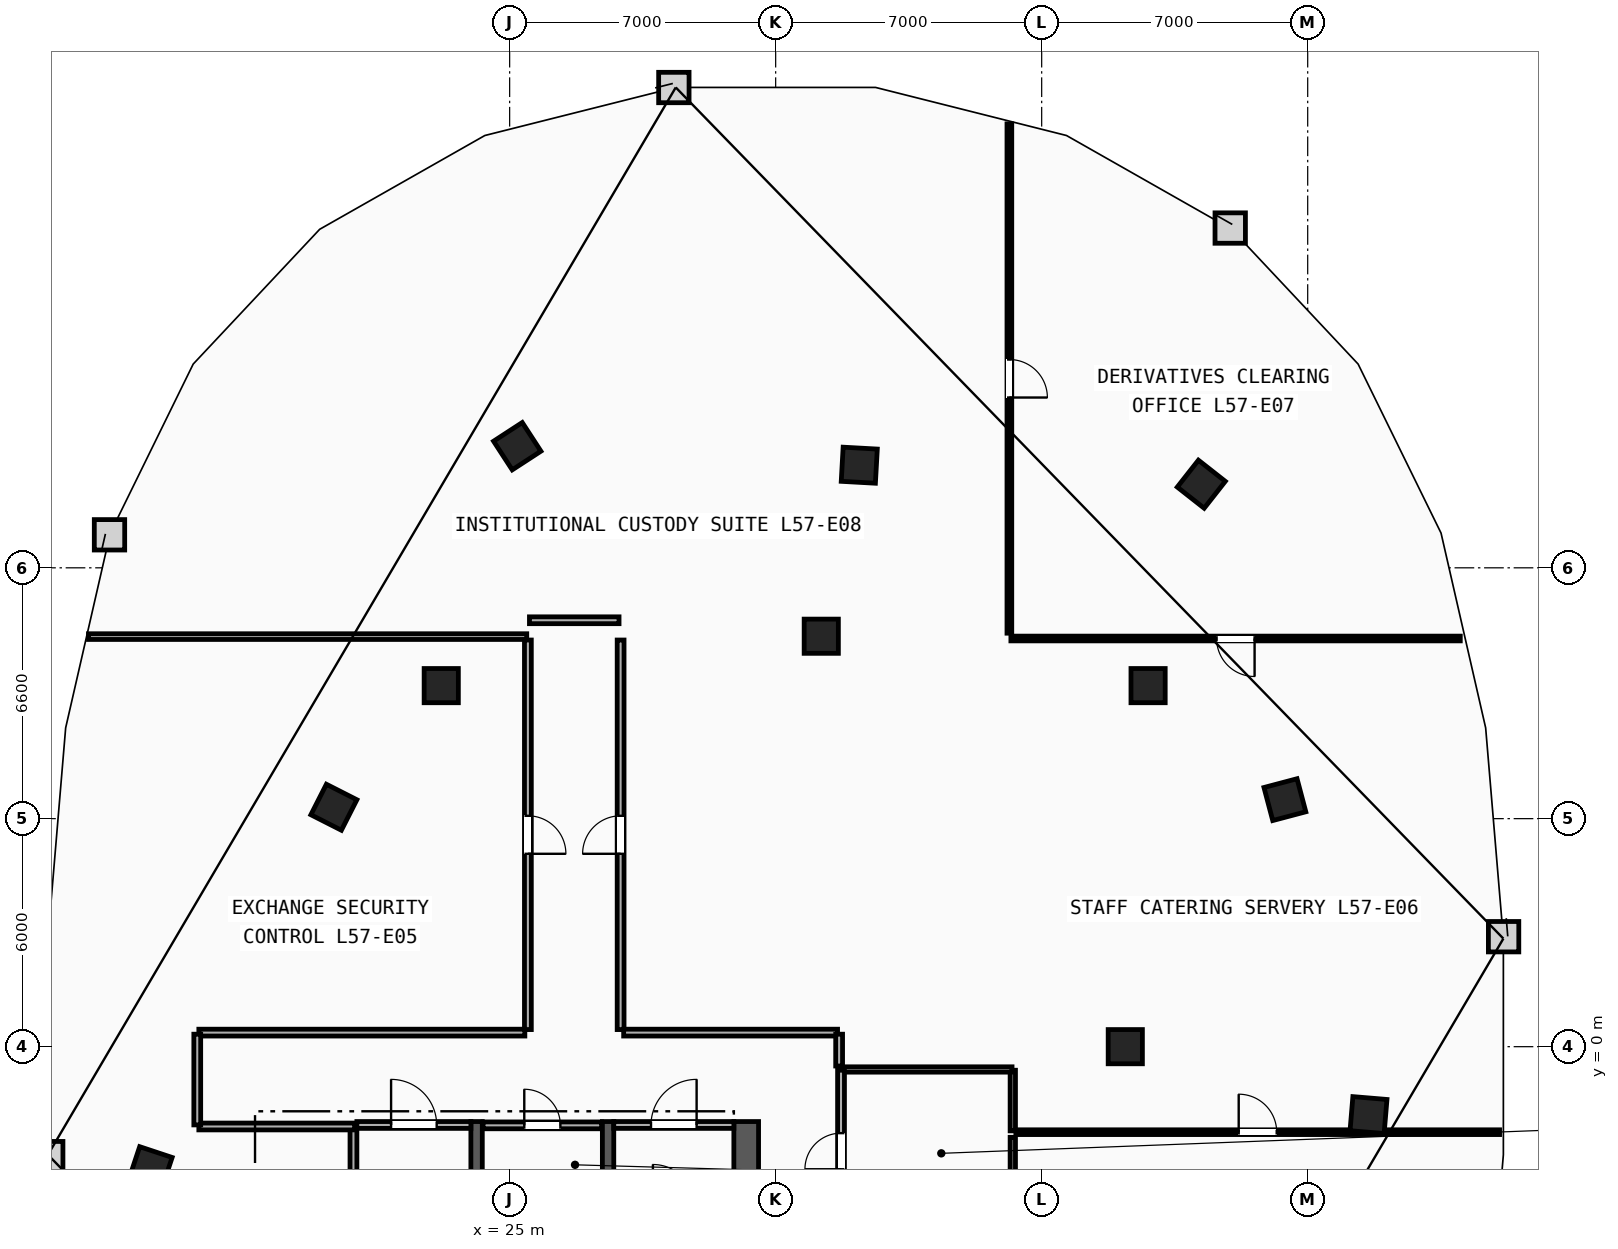
"""IFC4 building model, lengths in metres.
Left out: names, types, materials, properties, quantities, classifications, styles, units other than length and angle.
Written with IfcOpenShell. Run it as: python <this file> out.ifc"""

import sys

from ifc_helpers import new_model, si_unit, direction, frame, frame_2d, origin, origin_2d, place, context, subcontext, project, spatial, rectangle, extrude, element, fill, save


model = new_model("IFC4")
c1 = context("Model", 3, precision=1e-05, world=origin(), true_north=direction((0.0, 1.0)))
c2 = subcontext(c1, "Body", "Model", "MODEL_VIEW")
j1 = project(units=[si_unit("LENGTHUNIT", "METRE"), si_unit("PLANEANGLEUNIT", "RADIAN")], contexts=[c1])
p1 = place(None, origin())
s1 = spatial("IfcSite", under=j1, at=p1, CompositionType="ELEMENT")
p2 = place(p1, origin())
s2 = spatial("IfcBuilding", under=s1, at=p2, CompositionType="ELEMENT")
p3 = place(p2, frame((0.0, 0.0, 217.0)))
s3 = spatial("IfcBuildingStorey", under=s2, at=p3, CompositionType="ELEMENT", Elevation=217.0)
for number, where, z_axis, x_axis in (
    (1, (41.2, 0.0, 0.0), (0.0, 0.0, 1.0), (1.0, 0.0, 0.0)),
    (2, (41.8, 9.5, 0.0), (0.0, 0.0, 1.0), (1.0, 0.0, 0.0)),
    (3, (33.2, 10.8, 0.0), (0.0, 0.0, 1.0), (1.0, 0.0, 0.0)),
    (4, (23.2, 9.5, 0.0), (0.0, 0.0, 1.0), (1.0, 0.0, 0.0)),
    (5, (15.55, -3.2, 0.0), (0.0, 0.0, 1.0), (-0.315, -0.949, 0.0)),
    (6, (47.6, -1.8, 0.0), (0.0, 0.0, 1.0), (0.084, 0.997, 0.0)),
    (7, (45.4, 6.5, 0.0), (0.0, 0.0, 1.0), (-0.256, 0.967, 0.0)),
    (8, (43.2, 14.8, 0.0), (0.0, 0.0, 1.0), (-0.786, 0.618, 0.0)),
    (9, (34.2, 15.3, 0.0), (0.0, 0.0, 1.0), (-0.998, 0.055, 0.0)),
    (10, (25.2, 15.8, 0.0), (0.0, 0.0, 1.0), (-0.838, -0.546, 0.0)),
    (11, (20.375, 6.3, 0.0), (0.0, 0.0, 1.0), (-0.453, -0.892, 0.0)),
):
    element("IfcColumn", number, at=place(p3, frame(where, z_axis=z_axis, x_axis=x_axis)), inside=s3, PredefinedType="COLUMN", context=c2, shape_type="SweptSolid", body=[
        extrude(rectangle(XDim=0.9, YDim=0.9, at=origin_2d()), origin(), (0.0, 0.0, 1.0), 3.6),
    ])
p4 = place(p3, frame((31.225, -15.3, 0.0), z_axis=(0.0, 0.0, 1.0), x_axis=(0.0, 1.0, 0.0)))
e12 = element("IfcWall", 12, at=p4, inside=s3, PredefinedType="SHEAR", context=c2, shape_type="SweptSolid", body=[
    extrude(rectangle(XDim=13.33, YDim=0.65, at=frame_2d((6.665, 0.0))), origin(), (0.0, 0.0, 1.0), 3.34),
])
for number, where, z_axis, x_axis in (
    (13, (27.59, -12.65, 0.0), (0.0, 0.0, 1.0), (0.0, 1.0, 0.0)),
    (14, (24.13, -12.65, 0.0), (0.0, 0.0, 1.0), (0.0, 1.0, 0.0)),
):
    element("IfcWall", number, at=place(p3, frame(where, z_axis=z_axis, x_axis=x_axis)), inside=s3, PredefinedType="SHEAR", context=c2, shape_type="SweptSolid", body=[
        extrude(rectangle(XDim=10.68, YDim=0.3, at=frame_2d((5.34, 0.0))), origin(), (0.0, 0.0, 1.0), 3.34),
    ])
p5 = place(p3, frame((20.89, -7.45, 0.0), z_axis=(0.0, 0.0, 1.0), x_axis=(0.0, 1.0, 0.0)))
e15 = element("IfcWall", 15, at=p5, inside=s3, PredefinedType="PARTITIONING", context=c2, shape_type="SweptSolid", body=[
    extrude(rectangle(XDim=5.3, YDim=0.18, at=frame_2d((2.65, 0.0))), origin(), (0.0, 0.0, 1.0), 3.34),
])
p6 = place(p3, frame((20.98, -2.06, 0.0), z_axis=(0.0, 0.0, 1.0), x_axis=(1.0, 0.0, 0.0)))
e16 = element("IfcWall", 16, at=p6, inside=s3, PredefinedType="PARTITIONING", context=c2, shape_type="SweptSolid", body=[
    extrude(rectangle(XDim=3.0, YDim=0.18, at=frame_2d((1.5, 0.0))), origin(), (0.0, 0.0, 1.0), 3.34),
])
p7 = place(p6, frame((0.9, 0.0, 0.0)))
e17 = element("IfcOpeningElement", 17, at=p7, cuts=e16, PredefinedType="OPENING", context=c2, shape_type="SweptSolid", body=[
    extrude(rectangle(XDim=1.2, YDim=2.15, at=frame_2d((0.6, 1.075))), frame((0.0, 0.1, 0.0), z_axis=(0.0, -1.0, 0.0), x_axis=(1.0, 0.0, 0.0)), (0.0, 0.0, 1.0), 0.2),
])
p8 = place(p3, frame((27.74, -2.06, 0.0), z_axis=(0.0, 0.0, 1.0), x_axis=(1.0, 0.0, 0.0)))
e18 = element("IfcWall", 18, at=p8, inside=s3, PredefinedType="PARTITIONING", context=c2, shape_type="SweptSolid", body=[
    extrude(rectangle(XDim=3.16, YDim=0.18, at=frame_2d((1.58, 0.0))), origin(), (0.0, 0.0, 1.0), 3.34),
])
p9 = place(p8, frame((0.98, 0.0, 0.0)))
e19 = element("IfcOpeningElement", 19, at=p9, cuts=e18, PredefinedType="OPENING", context=c2, shape_type="SweptSolid", body=[
    extrude(rectangle(XDim=1.2, YDim=2.15, at=frame_2d((0.6, 1.075))), frame((0.0, 0.1, 0.0), z_axis=(0.0, -1.0, 0.0), x_axis=(1.0, 0.0, 0.0)), (0.0, 0.0, 1.0), 0.2),
])
p10 = place(p3, frame((24.3, -2.07, 0.0), z_axis=(0.0, 0.0, 1.0), x_axis=(1.0, 0.0, 0.0)))
e20 = element("IfcWall", 20, at=p10, inside=s3, PredefinedType="PARTITIONING", context=c2, shape_type="SweptSolid", body=[
    extrude(rectangle(XDim=3.12, YDim=0.18, at=frame_2d((1.56, 0.0))), origin(), (0.0, 0.0, 1.0), 3.34),
])
p11 = place(p10, frame((1.085, 0.0, 0.0)))
e21 = element("IfcOpeningElement", 21, at=p11, cuts=e20, PredefinedType="OPENING", context=c2, shape_type="SweptSolid", body=[
    extrude(rectangle(XDim=0.95, YDim=2.1, at=frame_2d((0.475, 1.05))), frame((0.0, 0.1, 0.0), z_axis=(0.0, -1.0, 0.0), x_axis=(1.0, 0.0, 0.0)), (0.0, 0.0, 1.0), 0.2),
])
p12 = place(p3, frame((38.24, -4.895, 0.0), z_axis=(0.0, 0.0, 1.0), x_axis=(0.0, 1.0, 0.0)))
e22 = element("IfcWall", 22, at=p12, inside=s3, PredefinedType="PARTITIONING", context=c2, shape_type="SweptSolid", body=[
    extrude(rectangle(XDim=2.51, YDim=0.14, at=frame_2d((1.255, 0.0))), origin(), (0.0, 0.0, 1.0), 3.34),
])
p13 = place(p3, frame((38.24, -2.215, 0.0), z_axis=(0.0, 0.0, 1.0), x_axis=(0.0, 1.0, 0.0)))
e23 = element("IfcWall", 23, at=p13, inside=s3, PredefinedType="PARTITIONING", context=c2, shape_type="SweptSolid", body=[
    extrude(rectangle(XDim=1.595, YDim=0.14, at=frame_2d((0.797, 0.0))), origin(), (0.0, 0.0, 1.0), 3.34),
])
p14 = place(p3, frame((33.74, -0.6, 0.0), z_axis=(0.0, 0.0, 1.0), x_axis=(1.0, 0.0, 0.0)))
e24 = element("IfcWall", 24, at=p14, inside=s3, PredefinedType="PARTITIONING", context=c2, shape_type="SweptSolid", body=[
    extrude(rectangle(XDim=4.48, YDim=0.14, at=frame_2d((2.24, 0.0))), origin(), (0.0, 0.0, 1.0), 3.34),
])
p15 = place(p3, frame((33.72, -4.88, 0.0), z_axis=(0.0, 0.0, 1.0), x_axis=(0.0, 1.0, 0.0)))
e25 = element("IfcWall", 25, at=p15, inside=s3, PredefinedType="PARTITIONING", context=c2, shape_type="SweptSolid", body=[
    extrude(rectangle(XDim=4.26, YDim=0.18, at=frame_2d((2.13, 0.0))), origin(), (0.0, 0.0, 1.0), 3.34),
])
p16 = place(p15, frame((1.655, 0.0, 0.0)))
e26 = element("IfcOpeningElement", 26, at=p16, cuts=e25, PredefinedType="OPENING", context=c2, shape_type="SweptSolid", body=[
    extrude(rectangle(XDim=0.95, YDim=2.1, at=frame_2d((0.475, 1.05))), frame((0.0, 0.1, 0.0), z_axis=(0.0, -1.0, 0.0), x_axis=(1.0, 0.0, 0.0)), (0.0, 0.0, 1.0), 0.2),
])
p17 = place(p3, frame((13.918, 10.79, 0.0), z_axis=(0.0, 0.0, 1.0), x_axis=(1.0, 0.0, 0.0)))
e27 = element("IfcWall", 27, at=p17, inside=s3, PredefinedType="PARTITIONING", context=c2, shape_type="SweptSolid", body=[
    extrude(rectangle(XDim=11.532, YDim=0.15, at=frame_2d((5.766, 0.0))), origin(), (0.0, 0.0, 1.0), 3.34),
])
p18 = place(p3, frame((25.48, 10.7, 0.0), z_axis=(0.0, 0.0, 1.0), x_axis=(0.0, -1.0, 0.0)))
e28 = element("IfcWall", 28, at=p18, inside=s3, PredefinedType="PARTITIONING", context=c2, shape_type="SweptSolid", body=[
    extrude(rectangle(XDim=10.25, YDim=0.18, at=frame_2d((5.125, 0.0))), origin(), (0.0, 0.0, 1.0), 3.34),
])
p19 = place(p18, frame((4.625, 0.0, 0.0)))
e29 = element("IfcOpeningElement", 29, at=p19, cuts=e28, PredefinedType="OPENING", context=c2, shape_type="SweptSolid", body=[
    extrude(rectangle(XDim=1.0, YDim=2.15, at=frame_2d((0.5, 1.075))), frame((0.0, 0.1, 0.0), z_axis=(0.0, -1.0, 0.0), x_axis=(1.0, 0.0, 0.0)), (0.0, 0.0, 1.0), 0.2),
])
p20 = place(p3, frame((25.4, 0.37, 0.0), z_axis=(0.0, 0.0, 1.0), x_axis=(-1.0, 0.0, 0.0)))
e30 = element("IfcWall", 30, at=p20, inside=s3, PredefinedType="PARTITIONING", context=c2, shape_type="SweptSolid", body=[
    extrude(rectangle(XDim=8.578, YDim=0.18, at=frame_2d((4.289, 0.0))), origin(), (0.0, 0.0, 1.0), 3.34),
])
p21 = place(p3, frame((16.822, -2.1, 0.0), z_axis=(0.0, 0.0, 1.0), x_axis=(1.0, 0.0, 0.0)))
e31 = element("IfcWall", 31, at=p21, inside=s3, PredefinedType="PARTITIONING", context=c2, shape_type="SweptSolid", body=[
    extrude(rectangle(XDim=4.098, YDim=0.18, at=frame_2d((2.049, 0.0))), origin(), (0.0, 0.0, 1.0), 3.34),
])
p22 = place(p3, frame((16.78, 0.329, 0.0), z_axis=(0.0, 0.0, 1.0), x_axis=(0.0, -1.0, 0.0)))
e32 = element("IfcWall", 32, at=p22, inside=s3, PredefinedType="PARTITIONING", context=c2, shape_type="SweptSolid", body=[
    extrude(rectangle(XDim=2.387, YDim=0.18, at=frame_2d((1.194, 0.0))), origin(), (0.0, 0.0, 1.0), 3.34),
])
p23 = place(p3, frame((27.92, 0.45, 0.0), z_axis=(0.0, 0.0, 1.0), x_axis=(0.0, 1.0, 0.0)))
e33 = element("IfcWall", 33, at=p23, inside=s3, PredefinedType="PARTITIONING", context=c2, shape_type="SweptSolid", body=[
    extrude(rectangle(XDim=10.25, YDim=0.18, at=frame_2d((5.125, 0.0))), origin(), (0.0, 0.0, 1.0), 3.34),
])
p24 = place(p23, frame((4.625, 0.0, 0.0)))
e34 = element("IfcOpeningElement", 34, at=p24, cuts=e33, PredefinedType="OPENING", context=c2, shape_type="SweptSolid", body=[
    extrude(rectangle(XDim=1.0, YDim=2.15, at=frame_2d((0.5, 1.075))), frame((0.0, 0.1, 0.0), z_axis=(0.0, -1.0, 0.0), x_axis=(1.0, 0.0, 0.0)), (0.0, 0.0, 1.0), 0.2),
])
p25 = place(p3, frame((33.628, 0.37, 0.0), z_axis=(0.0, 0.0, 1.0), x_axis=(-1.0, 0.0, 0.0)))
e35 = element("IfcWall", 35, at=p25, inside=s3, PredefinedType="PARTITIONING", context=c2, shape_type="SweptSolid", body=[
    extrude(rectangle(XDim=5.628, YDim=0.18, at=frame_2d((2.814, 0.0))), origin(), (0.0, 0.0, 1.0), 3.34),
])
p26 = place(p3, frame((33.67, -0.509, 0.0), z_axis=(0.0, 0.0, 1.0), x_axis=(0.0, 1.0, 0.0)))
e36 = element("IfcWall", 36, at=p26, inside=s3, PredefinedType="PARTITIONING", context=c2, shape_type="SweptSolid", body=[
    extrude(rectangle(XDim=0.837, YDim=0.18, at=frame_2d((0.418, 0.0))), origin(), (0.0, 0.0, 1.0), 3.34),
])
p27 = place(p3, frame((27.878, 11.22, 0.0), z_axis=(0.0, 0.0, 1.0), x_axis=(-1.0, 0.0, 0.0)))
e37 = element("IfcWall", 37, at=p27, inside=s3, PredefinedType="PARTITIONING", context=c2, shape_type="SweptSolid", body=[
    extrude(rectangle(XDim=2.357, YDim=0.18, at=frame_2d((1.178, 0.0))), origin(), (0.0, 0.0, 1.0), 3.34),
])
p28 = place(p3, frame((38.32, -2.25, 0.0), z_axis=(0.0, 0.0, 1.0), x_axis=(1.0, 0.0, 0.0)))
e38 = element("IfcWall", 38, at=p28, inside=s3, PredefinedType="PARTITIONING", context=c2, shape_type="SweptSolid", body=[
    extrude(rectangle(XDim=12.729, YDim=0.125, at=frame_2d((6.365, 0.0))), origin(), (0.0, 0.0, 1.0), 3.34),
])
p29 = place(p28, frame((5.865, 0.0, 0.0)))
e39 = element("IfcOpeningElement", 39, at=p29, cuts=e38, PredefinedType="OPENING", context=c2, shape_type="SweptSolid", body=[
    extrude(rectangle(XDim=1.0, YDim=2.15, at=frame_2d((0.5, 1.075))), frame((0.0, 0.073, 0.0), z_axis=(0.0, -1.0, 0.0), x_axis=(1.0, 0.0, 0.0)), (0.0, 0.0, 1.0), 0.145),
])
p30 = place(p3, frame((50.015, 10.74, 0.0), z_axis=(0.0, 0.0, 1.0), x_axis=(-1.0, 0.0, 0.0)))
e40 = element("IfcWall", 40, at=p30, inside=s3, PredefinedType="PARTITIONING", context=c2, shape_type="SweptSolid", body=[
    extrude(rectangle(XDim=11.825, YDim=0.125, at=frame_2d((5.913, 0.0))), origin(), (0.0, 0.0, 1.0), 3.34),
])
p31 = place(p30, frame((5.412, 0.0, 0.0)))
e41 = element("IfcOpeningElement", 41, at=p31, cuts=e40, PredefinedType="OPENING", context=c2, shape_type="SweptSolid", body=[
    extrude(rectangle(XDim=1.0, YDim=2.15, at=frame_2d((0.5, 1.075))), frame((0.0, 0.073, 0.0), z_axis=(0.0, -1.0, 0.0), x_axis=(1.0, 0.0, 0.0)), (0.0, 0.0, 1.0), 0.145),
])
p32 = place(p3, frame((38.15, 24.281, 0.0), z_axis=(0.0, 0.0, 1.0), x_axis=(0.0, -1.0, 0.0)))
e42 = element("IfcWall", 42, at=p32, inside=s3, PredefinedType="PARTITIONING", context=c2, shape_type="SweptSolid", body=[
    extrude(rectangle(XDim=13.401, YDim=0.125, at=frame_2d((6.701, 0.0))), origin(), (0.0, 0.0, 1.0), 3.34),
])
p33 = place(p32, frame((6.201, 0.0, 0.0)))
e43 = element("IfcOpeningElement", 43, at=p33, cuts=e42, PredefinedType="OPENING", context=c2, shape_type="SweptSolid", body=[
    extrude(rectangle(XDim=1.0, YDim=2.15, at=frame_2d((0.5, 1.075))), frame((0.0, 0.073, 0.0), z_axis=(0.0, -1.0, 0.0), x_axis=(1.0, 0.0, 0.0)), (0.0, 0.0, 1.0), 0.145),
])
p34 = place(p7, origin())
e44 = element("IfcDoor", 44, at=p34, inside=s3, OperationType="SINGLE_SWING_LEFT", PredefinedType="DOOR", context=c2, shape_type="SweptSolid", body=[
    extrude(rectangle(XDim=1.2, YDim=2.15, at=frame_2d((0.6, 1.075))), frame((0.0, 0.025, 0.0), z_axis=(0.0, -1.0, 0.0), x_axis=(1.0, 0.0, 0.0)), (0.0, 0.0, 1.0), 0.05),
])
fill(e17, e44)
p35 = place(p9, origin())
e45 = element("IfcDoor", 45, at=p35, inside=s3, OperationType="SINGLE_SWING_RIGHT", PredefinedType="DOOR", context=c2, shape_type="SweptSolid", body=[
    extrude(rectangle(XDim=1.2, YDim=2.15, at=frame_2d((0.6, 1.075))), frame((0.0, 0.025, 0.0), z_axis=(0.0, -1.0, 0.0), x_axis=(1.0, 0.0, 0.0)), (0.0, 0.0, 1.0), 0.05),
])
fill(e19, e45)
p36 = place(p33, origin())
e46 = element("IfcDoor", 46, at=p36, inside=s3, OperationType="SINGLE_SWING_RIGHT", PredefinedType="DOOR", context=c2, shape_type="SweptSolid", body=[
    extrude(rectangle(XDim=1.0, YDim=2.15, at=frame_2d((0.5, 1.075))), frame((0.0, 0.025, 0.0), z_axis=(0.0, -1.0, 0.0), x_axis=(1.0, 0.0, 0.0)), (0.0, 0.0, 1.0), 0.05),
])
fill(e43, e46)
p37 = place(p29, origin())
e47 = element("IfcDoor", 47, at=p37, inside=s3, OperationType="SINGLE_SWING_LEFT", PredefinedType="DOOR", context=c2, shape_type="SweptSolid", body=[
    extrude(rectangle(XDim=1.0, YDim=2.15, at=frame_2d((0.5, 1.075))), frame((0.0, 0.025, 0.0), z_axis=(0.0, -1.0, 0.0), x_axis=(1.0, 0.0, 0.0)), (0.0, 0.0, 1.0), 0.05),
])
fill(e39, e47)
p38 = place(p31, origin())
e48 = element("IfcDoor", 48, at=p38, inside=s3, OperationType="SINGLE_SWING_LEFT", PredefinedType="DOOR", context=c2, shape_type="SweptSolid", body=[
    extrude(rectangle(XDim=1.0, YDim=2.15, at=frame_2d((0.5, 1.075))), frame((0.0, 0.025, 0.0), z_axis=(0.0, -1.0, 0.0), x_axis=(1.0, 0.0, 0.0)), (0.0, 0.0, 1.0), 0.05),
])
fill(e41, e48)
p39 = place(p19, origin())
e49 = element("IfcDoor", 49, at=p39, inside=s3, OperationType="SINGLE_SWING_RIGHT", PredefinedType="DOOR", context=c2, shape_type="SweptSolid", body=[
    extrude(rectangle(XDim=1.0, YDim=2.15, at=frame_2d((0.5, 1.075))), frame((0.0, 0.025, 0.0), z_axis=(0.0, -1.0, 0.0), x_axis=(1.0, 0.0, 0.0)), (0.0, 0.0, 1.0), 0.05),
])
fill(e29, e49)
p40 = place(p24, origin())
e50 = element("IfcDoor", 50, at=p40, inside=s3, OperationType="SINGLE_SWING_LEFT", PredefinedType="DOOR", context=c2, shape_type="SweptSolid", body=[
    extrude(rectangle(XDim=1.0, YDim=2.15, at=frame_2d((0.5, 1.075))), frame((0.0, 0.025, 0.0), z_axis=(0.0, -1.0, 0.0), x_axis=(1.0, 0.0, 0.0)), (0.0, 0.0, 1.0), 0.05),
])
fill(e34, e50)
p41 = place(p16, origin())
e51 = element("IfcDoor", 51, at=p41, inside=s3, OperationType="SINGLE_SWING_LEFT", PredefinedType="DOOR", context=c2, shape_type="SweptSolid", body=[
    extrude(rectangle(XDim=0.95, YDim=2.1, at=frame_2d((0.475, 1.05))), frame((0.0, 0.025, 0.0), z_axis=(0.0, -1.0, 0.0), x_axis=(1.0, 0.0, 0.0)), (0.0, 0.0, 1.0), 0.05),
])
fill(e26, e51)
p42 = place(p11, origin())
e52 = element("IfcDoor", 52, at=p42, inside=s3, OperationType="SINGLE_SWING_LEFT", PredefinedType="DOOR", context=c2, shape_type="SweptSolid", body=[
    extrude(rectangle(XDim=0.95, YDim=2.1, at=frame_2d((0.475, 1.05))), frame((0.0, 0.025, 0.0), z_axis=(0.0, -1.0, 0.0), x_axis=(1.0, 0.0, 0.0)), (0.0, 0.0, 1.0), 0.05),
])
fill(e21, e52)
save(model, sys.argv[1])
